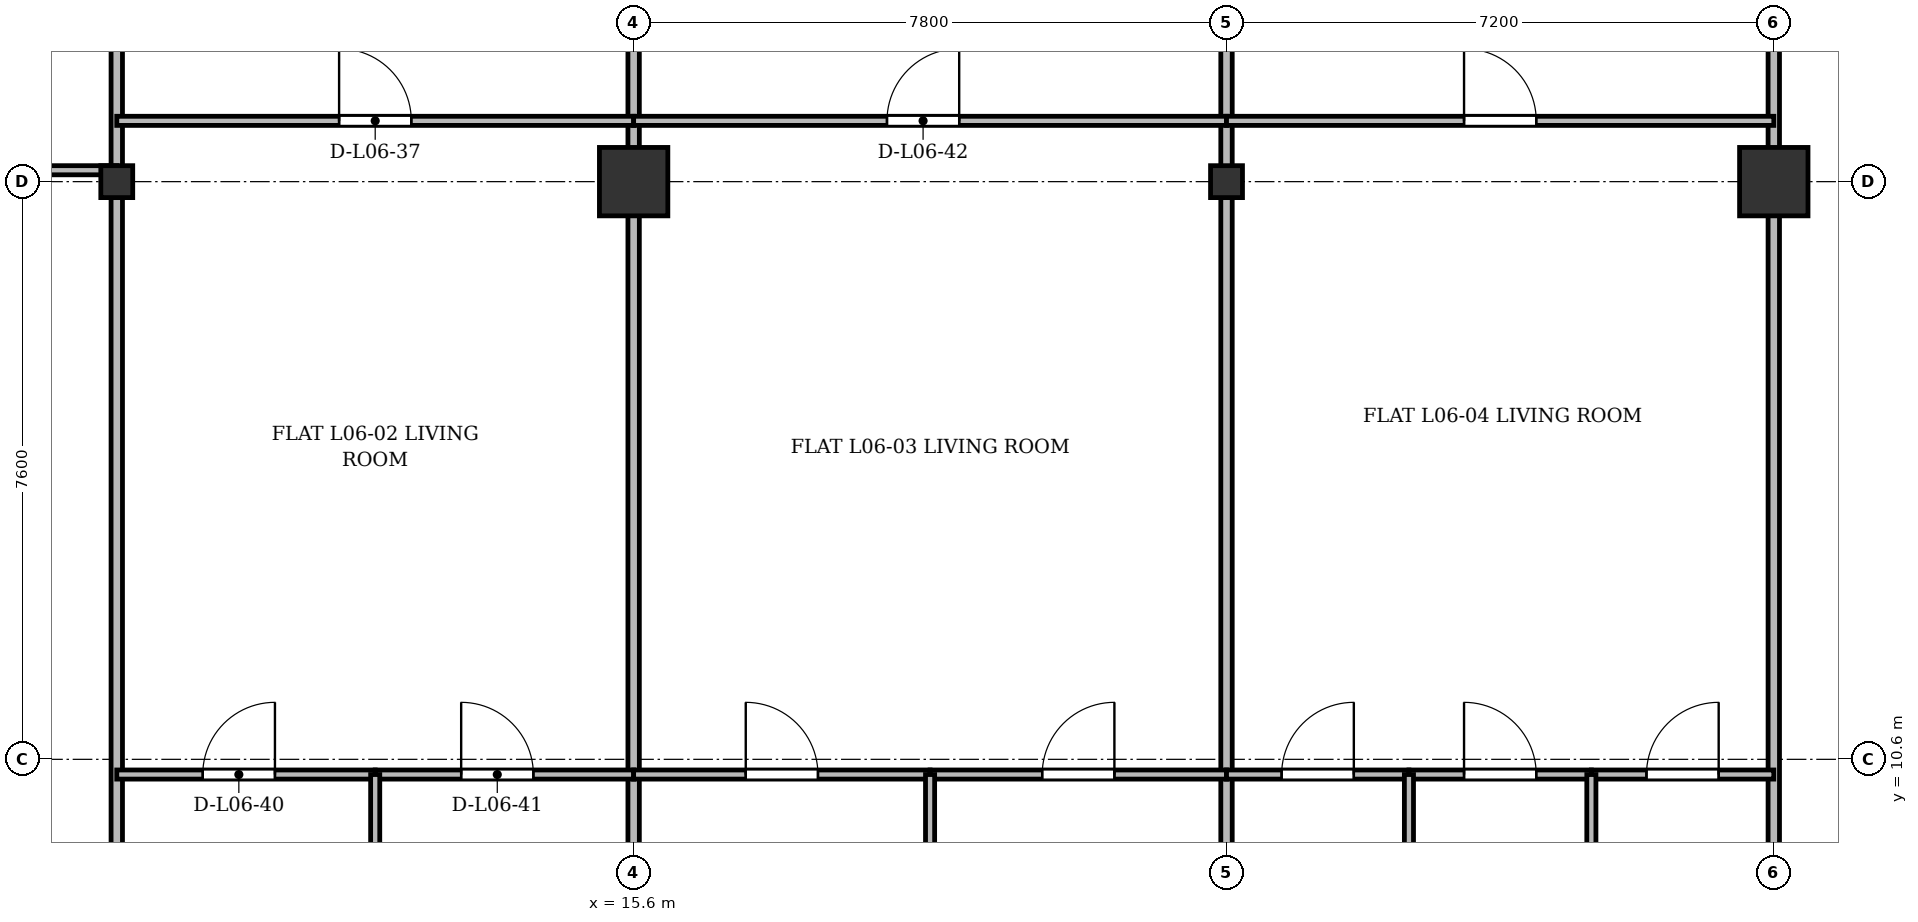
"""IFC4 building model, lengths in metres.
Left out: names, types, materials, properties, quantities, classifications, styles, units other than length and angle.
Written with IfcOpenShell. Run it as: python <this file> out.ifc"""

import sys

from ifc_helpers import new_model, si_unit, direction, frame, frame_2d, origin, origin_2d, place, context, subcontext, project, spatial, rectangle, i_section, extrude, source, transform, mapped, element, fill, save


model = new_model("IFC4")
c1 = context("Model", 3, precision=1e-05, world=origin(), true_north=direction((0.0, 1.0)))
c2 = subcontext(c1, "Body", "Model", "MODEL_VIEW")
j1 = project(units=[si_unit("LENGTHUNIT", "METRE"), si_unit("PLANEANGLEUNIT", "RADIAN")], contexts=[c1])
p1 = place(None, origin())
s1 = spatial("IfcSite", under=j1, at=p1, CompositionType="ELEMENT")
p2 = place(p1, origin())
s2 = spatial("IfcBuilding", under=s1, at=p2, CompositionType="ELEMENT")
p3 = place(p2, frame((0.0, 0.0, 27.1)))
s3 = spatial("IfcBuildingStorey", under=s2, at=p3, CompositionType="ELEMENT", Elevation=27.1)
m1 = source(origin(), c2, "Body", "SweptSolid", [
    extrude(i_section(OverallWidth=0.42, OverallDepth=0.42, WebThickness=0.026, FlangeThickness=0.04, at=origin_2d()), origin(), (0.0, 0.0, 1.0), 3.6),
])
p4 = place(p3, frame((8.8, 18.2, 0.0), z_axis=(0.0, 0.0, 1.0), x_axis=(1.0, 0.0, 0.0)))
e1 = element("IfcColumn", 1, at=p4, inside=s3, PredefinedType="COLUMN", context=c2, shape_type="MappedRepresentation", body=[
    mapped(m1, transform((0.0, 0.0, 0.0), x_axis=(1.0, 0.0, 0.0), y_axis=(0.0, 1.0, 0.0), z_axis=(0.0, 0.0, 1.0), scale=1.0)),
])
m2 = source(origin(), c2, "Body", "SweptSolid", [
    extrude(rectangle(XDim=0.9, YDim=0.9, at=origin_2d()), origin(), (0.0, 0.0, 1.0), 3.6),
])
p5 = place(p3, frame((15.6, 18.2, 0.0), z_axis=(0.0, 0.0, 1.0), x_axis=(1.0, 0.0, 0.0)))
e2 = element("IfcColumn", 2, at=p5, inside=s3, PredefinedType="COLUMN", context=c2, shape_type="MappedRepresentation", body=[
    mapped(m2, transform((0.0, 0.0, 0.0), x_axis=(1.0, 0.0, 0.0), y_axis=(0.0, 1.0, 0.0), z_axis=(0.0, 0.0, 1.0), scale=1.0)),
])
p6 = place(p3, frame((23.4, 18.2, 0.0), z_axis=(0.0, 0.0, 1.0), x_axis=(1.0, 0.0, 0.0)))
e3 = element("IfcColumn", 3, at=p6, inside=s3, PredefinedType="COLUMN", context=c2, shape_type="MappedRepresentation", body=[
    mapped(m1, transform((0.0, 0.0, 0.0), x_axis=(1.0, 0.0, 0.0), y_axis=(0.0, 1.0, 0.0), z_axis=(0.0, 0.0, 1.0), scale=1.0)),
])
p7 = place(p3, frame((30.6, 18.2, 0.0), z_axis=(0.0, 0.0, 1.0), x_axis=(1.0, 0.0, 0.0)))
e4 = element("IfcColumn", 4, at=p7, inside=s3, PredefinedType="COLUMN", context=c2, shape_type="MappedRepresentation", body=[
    mapped(m2, transform((0.0, 0.0, 0.0), x_axis=(1.0, 0.0, 0.0), y_axis=(0.0, 1.0, 0.0), z_axis=(0.0, 0.0, 1.0), scale=1.0)),
])
for number, where, z_axis, x_axis in (
    (5, (8.8, 3.145, 0.0), (0.0, 0.0, 1.0), (0.0, 1.0, 0.0)),
    (6, (15.6, 3.145, 0.0), (0.0, 0.0, 1.0), (0.0, 1.0, 0.0)),
    (7, (23.4, 3.145, 0.0), (0.0, 0.0, 1.0), (0.0, 1.0, 0.0)),
    (8, (30.6, 3.145, 0.0), (0.0, 0.0, 1.0), (0.0, 1.0, 0.0)),
):
    element("IfcWall", number, at=place(p3, frame(where, z_axis=z_axis, x_axis=x_axis)), inside=s3, PredefinedType="PARTITIONING", context=c2, shape_type="SweptSolid", body=[
        extrude(rectangle(XDim=24.455, YDim=0.15, at=frame_2d((12.228, 0.0))), origin(), (0.0, 0.0, 1.0), 2.752),
    ])
p8 = place(p3, frame((4.76, 18.35, 0.0), z_axis=(0.0, 0.0, 1.0), x_axis=(1.0, 0.0, 0.0)))
e9 = element("IfcWall", 9, at=p8, inside=s3, PredefinedType="PARTITIONING", context=c2, shape_type="SweptSolid", body=[
    extrude(rectangle(XDim=4.04, YDim=0.12, at=frame_2d((2.02, 0.0))), origin(), (0.0, 0.0, 1.0), 2.69),
])
p9 = place(p8, frame((1.545, 0.0, 0.0)))
e10 = element("IfcOpeningElement", 10, at=p9, cuts=e9, PredefinedType="OPENING", context=c2, shape_type="SweptSolid", body=[
    extrude(rectangle(XDim=0.95, YDim=2.15, at=frame_2d((0.475, 1.075))), frame((0.0, 0.07, 0.0), z_axis=(0.0, -1.0, 0.0), x_axis=(1.0, 0.0, 0.0)), (0.0, 0.0, 1.0), 0.14),
])
p10 = place(p3, frame((8.8, 19.0, 0.0), z_axis=(0.0, 0.0, 1.0), x_axis=(1.0, 0.0, 0.0)))
e11 = element("IfcWall", 11, at=p10, inside=s3, PredefinedType="PARTITIONING", context=c2, shape_type="SweptSolid", body=[
    extrude(rectangle(XDim=6.8, YDim=0.12, at=frame_2d((3.4, 0.0))), origin(), (0.0, 0.0, 1.0), 2.752),
])
p11 = place(p10, frame((2.925, 0.0, 0.0)))
e12 = element("IfcOpeningElement", 12, at=p11, cuts=e11, PredefinedType="OPENING", context=c2, shape_type="SweptSolid", body=[
    extrude(rectangle(XDim=0.95, YDim=2.15, at=frame_2d((0.475, 1.075))), frame((0.0, 0.07, 0.0), z_axis=(0.0, -1.0, 0.0), x_axis=(1.0, 0.0, 0.0)), (0.0, 0.0, 1.0), 0.14),
])
p12 = place(p3, frame((8.8, 10.4, 0.0), z_axis=(0.0, 0.0, 1.0), x_axis=(1.0, 0.0, 0.0)))
e13 = element("IfcWall", 13, at=p12, inside=s3, PredefinedType="PARTITIONING", context=c2, shape_type="SweptSolid", body=[
    extrude(rectangle(XDim=3.4, YDim=0.12, at=frame_2d((1.7, 0.0))), origin(), (0.0, 0.0, 1.0), 2.752),
])
p13 = place(p12, frame((1.131, 0.0, 0.0)))
e14 = element("IfcOpeningElement", 14, at=p13, cuts=e13, PredefinedType="OPENING", context=c2, shape_type="SweptSolid", body=[
    extrude(rectangle(XDim=0.95, YDim=2.15, at=frame_2d((0.475, 1.075))), frame((0.0, 0.07, 0.0), z_axis=(0.0, -1.0, 0.0), x_axis=(1.0, 0.0, 0.0)), (0.0, 0.0, 1.0), 0.14),
])
p14 = place(p3, frame((12.2, 10.4, 0.0), z_axis=(0.0, 0.0, 1.0), x_axis=(1.0, 0.0, 0.0)))
e15 = element("IfcWall", 15, at=p14, inside=s3, PredefinedType="PARTITIONING", context=c2, shape_type="SweptSolid", body=[
    extrude(rectangle(XDim=3.4, YDim=0.12, at=frame_2d((1.7, 0.0))), origin(), (0.0, 0.0, 1.0), 2.752),
])
p15 = place(p14, frame((1.131, 0.0, 0.0)))
e16 = element("IfcOpeningElement", 16, at=p15, cuts=e15, PredefinedType="OPENING", context=c2, shape_type="SweptSolid", body=[
    extrude(rectangle(XDim=0.95, YDim=2.15, at=frame_2d((0.475, 1.075))), frame((0.0, 0.07, 0.0), z_axis=(0.0, -1.0, 0.0), x_axis=(1.0, 0.0, 0.0)), (0.0, 0.0, 1.0), 0.14),
])
p16 = place(p3, frame((12.2, 3.145, 0.0), z_axis=(0.0, 0.0, 1.0), x_axis=(0.0, 1.0, 0.0)))
e17 = element("IfcWall", 17, at=p16, inside=s3, PredefinedType="PARTITIONING", context=c2, shape_type="SweptSolid", body=[
    extrude(rectangle(XDim=7.255, YDim=0.12, at=frame_2d((3.627, 0.0))), origin(), (0.0, 0.0, 1.0), 2.69),
])
p17 = place(p3, frame((15.6, 19.0, 0.0), z_axis=(0.0, 0.0, 1.0), x_axis=(1.0, 0.0, 0.0)))
e18 = element("IfcWall", 18, at=p17, inside=s3, PredefinedType="PARTITIONING", context=c2, shape_type="SweptSolid", body=[
    extrude(rectangle(XDim=7.8, YDim=0.12, at=frame_2d((3.9, 0.0))), origin(), (0.0, 0.0, 1.0), 2.752),
])
p18 = place(p17, frame((3.333, 0.0, 0.0)))
e19 = element("IfcOpeningElement", 19, at=p18, cuts=e18, PredefinedType="OPENING", context=c2, shape_type="SweptSolid", body=[
    extrude(rectangle(XDim=0.95, YDim=2.15, at=frame_2d((0.475, 1.075))), frame((0.0, 0.07, 0.0), z_axis=(0.0, -1.0, 0.0), x_axis=(1.0, 0.0, 0.0)), (0.0, 0.0, 1.0), 0.14),
])
p19 = place(p3, frame((15.6, 10.4, 0.0), z_axis=(0.0, 0.0, 1.0), x_axis=(1.0, 0.0, 0.0)))
e20 = element("IfcWall", 20, at=p19, inside=s3, PredefinedType="PARTITIONING", context=c2, shape_type="SweptSolid", body=[
    extrude(rectangle(XDim=3.9, YDim=0.12, at=frame_2d((1.95, 0.0))), origin(), (0.0, 0.0, 1.0), 2.752),
])
p20 = place(p19, frame((1.475, 0.0, 0.0)))
e21 = element("IfcOpeningElement", 21, at=p20, cuts=e20, PredefinedType="OPENING", context=c2, shape_type="SweptSolid", body=[
    extrude(rectangle(XDim=0.95, YDim=2.15, at=frame_2d((0.475, 1.075))), frame((0.0, 0.07, 0.0), z_axis=(0.0, -1.0, 0.0), x_axis=(1.0, 0.0, 0.0)), (0.0, 0.0, 1.0), 0.14),
])
p21 = place(p3, frame((19.5, 10.4, 0.0), z_axis=(0.0, 0.0, 1.0), x_axis=(1.0, 0.0, 0.0)))
e22 = element("IfcWall", 22, at=p21, inside=s3, PredefinedType="PARTITIONING", context=c2, shape_type="SweptSolid", body=[
    extrude(rectangle(XDim=3.9, YDim=0.12, at=frame_2d((1.95, 0.0))), origin(), (0.0, 0.0, 1.0), 2.752),
])
p22 = place(p21, frame((1.475, 0.0, 0.0)))
e23 = element("IfcOpeningElement", 23, at=p22, cuts=e22, PredefinedType="OPENING", context=c2, shape_type="SweptSolid", body=[
    extrude(rectangle(XDim=0.95, YDim=2.15, at=frame_2d((0.475, 1.075))), frame((0.0, 0.07, 0.0), z_axis=(0.0, -1.0, 0.0), x_axis=(1.0, 0.0, 0.0)), (0.0, 0.0, 1.0), 0.14),
])
p23 = place(p3, frame((19.5, 3.145, 0.0), z_axis=(0.0, 0.0, 1.0), x_axis=(0.0, 1.0, 0.0)))
e24 = element("IfcWall", 24, at=p23, inside=s3, PredefinedType="PARTITIONING", context=c2, shape_type="SweptSolid", body=[
    extrude(rectangle(XDim=7.255, YDim=0.12, at=frame_2d((3.627, 0.0))), origin(), (0.0, 0.0, 1.0), 2.69),
])
p24 = place(p3, frame((23.4, 19.0, 0.0), z_axis=(0.0, 0.0, 1.0), x_axis=(1.0, 0.0, 0.0)))
e25 = element("IfcWall", 25, at=p24, inside=s3, PredefinedType="PARTITIONING", context=c2, shape_type="SweptSolid", body=[
    extrude(rectangle(XDim=7.2, YDim=0.12, at=frame_2d((3.6, 0.0))), origin(), (0.0, 0.0, 1.0), 2.752),
])
p25 = place(p24, frame((3.125, 0.0, 0.0)))
e26 = element("IfcOpeningElement", 26, at=p25, cuts=e25, PredefinedType="OPENING", context=c2, shape_type="SweptSolid", body=[
    extrude(rectangle(XDim=0.95, YDim=2.15, at=frame_2d((0.475, 1.075))), frame((0.0, 0.07, 0.0), z_axis=(0.0, -1.0, 0.0), x_axis=(1.0, 0.0, 0.0)), (0.0, 0.0, 1.0), 0.14),
])
p26 = place(p3, frame((23.4, 10.4, 0.0), z_axis=(0.0, 0.0, 1.0), x_axis=(1.0, 0.0, 0.0)))
e27 = element("IfcWall", 27, at=p26, inside=s3, PredefinedType="PARTITIONING", context=c2, shape_type="SweptSolid", body=[
    extrude(rectangle(XDim=2.4, YDim=0.12, at=frame_2d((1.2, 0.0))), origin(), (0.0, 0.0, 1.0), 2.752),
])
p27 = place(p26, frame((0.725, 0.0, 0.0)))
e28 = element("IfcOpeningElement", 28, at=p27, cuts=e27, PredefinedType="OPENING", context=c2, shape_type="SweptSolid", body=[
    extrude(rectangle(XDim=0.95, YDim=2.15, at=frame_2d((0.475, 1.075))), frame((0.0, 0.07, 0.0), z_axis=(0.0, -1.0, 0.0), x_axis=(1.0, 0.0, 0.0)), (0.0, 0.0, 1.0), 0.14),
])
p28 = place(p3, frame((25.8, 10.4, 0.0), z_axis=(0.0, 0.0, 1.0), x_axis=(1.0, 0.0, 0.0)))
e29 = element("IfcWall", 29, at=p28, inside=s3, PredefinedType="PARTITIONING", context=c2, shape_type="SweptSolid", body=[
    extrude(rectangle(XDim=2.4, YDim=0.12, at=frame_2d((1.2, 0.0))), origin(), (0.0, 0.0, 1.0), 3.34),
])
p29 = place(p28, frame((0.725, 0.0, 0.0)))
e30 = element("IfcOpeningElement", 30, at=p29, cuts=e29, PredefinedType="OPENING", context=c2, shape_type="SweptSolid", body=[
    extrude(rectangle(XDim=0.95, YDim=2.15, at=frame_2d((0.475, 1.075))), frame((0.0, 0.07, 0.0), z_axis=(0.0, -1.0, 0.0), x_axis=(1.0, 0.0, 0.0)), (0.0, 0.0, 1.0), 0.14),
])
p30 = place(p3, frame((25.8, 3.145, 0.0), z_axis=(0.0, 0.0, 1.0), x_axis=(0.0, 1.0, 0.0)))
e31 = element("IfcWall", 31, at=p30, inside=s3, PredefinedType="PARTITIONING", context=c2, shape_type="SweptSolid", body=[
    extrude(rectangle(XDim=7.255, YDim=0.12, at=frame_2d((3.627, 0.0))), origin(), (0.0, 0.0, 1.0), 2.69),
])
p31 = place(p3, frame((28.2, 10.4, 0.0), z_axis=(0.0, 0.0, 1.0), x_axis=(1.0, 0.0, 0.0)))
e32 = element("IfcWall", 32, at=p31, inside=s3, PredefinedType="PARTITIONING", context=c2, shape_type="SweptSolid", body=[
    extrude(rectangle(XDim=2.4, YDim=0.12, at=frame_2d((1.2, 0.0))), origin(), (0.0, 0.0, 1.0), 2.752),
])
p32 = place(p31, frame((0.725, 0.0, 0.0)))
e33 = element("IfcOpeningElement", 33, at=p32, cuts=e32, PredefinedType="OPENING", context=c2, shape_type="SweptSolid", body=[
    extrude(rectangle(XDim=0.95, YDim=2.15, at=frame_2d((0.475, 1.075))), frame((0.0, 0.07, 0.0), z_axis=(0.0, -1.0, 0.0), x_axis=(1.0, 0.0, 0.0)), (0.0, 0.0, 1.0), 0.14),
])
p33 = place(p3, frame((28.2, 3.145, 0.0), z_axis=(0.0, 0.0, 1.0), x_axis=(0.0, 1.0, 0.0)))
e34 = element("IfcWall", 34, at=p33, inside=s3, PredefinedType="PARTITIONING", context=c2, shape_type="SweptSolid", body=[
    extrude(rectangle(XDim=7.255, YDim=0.12, at=frame_2d((3.627, 0.0))), origin(), (0.0, 0.0, 1.0), 2.69),
])
m3 = source(origin(), c2, "Body", "SweptSolid", [
    extrude(rectangle(XDim=0.95, YDim=2.15, at=frame_2d((0.475, 1.075))), frame((0.0, 0.025, 0.0), z_axis=(0.0, -1.0, 0.0), x_axis=(1.0, 0.0, 0.0)), (0.0, 0.0, 1.0), 0.05),
])
p34 = place(p11, origin())
e35 = element("IfcDoor", 35, at=p34, inside=s3, OperationType="SINGLE_SWING_LEFT", PredefinedType="DOOR", context=c2, shape_type="MappedRepresentation", body=[
    mapped(m3, transform((0.0, 0.0, 0.0), x_axis=(1.0, 0.0, 0.0), y_axis=(0.0, 1.0, 0.0), z_axis=(0.0, 0.0, 1.0), scale=1.0)),
])
fill(e12, e35)
p35 = place(p13, origin())
e36 = element("IfcDoor", 36, at=p35, inside=s3, OperationType="SINGLE_SWING_RIGHT", PredefinedType="DOOR", context=c2, shape_type="MappedRepresentation", body=[
    mapped(m3, transform((0.0, 0.0, 0.0), x_axis=(1.0, 0.0, 0.0), y_axis=(0.0, 1.0, 0.0), z_axis=(0.0, 0.0, 1.0), scale=1.0)),
])
fill(e14, e36)
p36 = place(p15, origin())
e37 = element("IfcDoor", 37, at=p36, inside=s3, OperationType="SINGLE_SWING_LEFT", PredefinedType="DOOR", context=c2, shape_type="MappedRepresentation", body=[
    mapped(m3, transform((0.0, 0.0, 0.0), x_axis=(1.0, 0.0, 0.0), y_axis=(0.0, 1.0, 0.0), z_axis=(0.0, 0.0, 1.0), scale=1.0)),
])
fill(e16, e37)
p37 = place(p18, origin())
e38 = element("IfcDoor", 38, at=p37, inside=s3, OperationType="SINGLE_SWING_RIGHT", PredefinedType="DOOR", context=c2, shape_type="MappedRepresentation", body=[
    mapped(m3, transform((0.0, 0.0, 0.0), x_axis=(1.0, 0.0, 0.0), y_axis=(0.0, 1.0, 0.0), z_axis=(0.0, 0.0, 1.0), scale=1.0)),
])
fill(e19, e38)
p38 = place(p20, origin())
e39 = element("IfcDoor", 39, at=p38, inside=s3, OperationType="SINGLE_SWING_LEFT", PredefinedType="DOOR", context=c2, shape_type="MappedRepresentation", body=[
    mapped(m3, transform((0.0, 0.0, 0.0), x_axis=(1.0, 0.0, 0.0), y_axis=(0.0, 1.0, 0.0), z_axis=(0.0, 0.0, 1.0), scale=1.0)),
])
fill(e21, e39)
p39 = place(p22, origin())
e40 = element("IfcDoor", 40, at=p39, inside=s3, OperationType="SINGLE_SWING_RIGHT", PredefinedType="DOOR", context=c2, shape_type="MappedRepresentation", body=[
    mapped(m3, transform((0.0, 0.0, 0.0), x_axis=(1.0, 0.0, 0.0), y_axis=(0.0, 1.0, 0.0), z_axis=(0.0, 0.0, 1.0), scale=1.0)),
])
fill(e23, e40)
p40 = place(p25, origin())
e41 = element("IfcDoor", 41, at=p40, inside=s3, OperationType="SINGLE_SWING_LEFT", PredefinedType="DOOR", context=c2, shape_type="MappedRepresentation", body=[
    mapped(m3, transform((0.0, 0.0, 0.0), x_axis=(1.0, 0.0, 0.0), y_axis=(0.0, 1.0, 0.0), z_axis=(0.0, 0.0, 1.0), scale=1.0)),
])
fill(e26, e41)
p41 = place(p27, origin())
e42 = element("IfcDoor", 42, at=p41, inside=s3, OperationType="SINGLE_SWING_RIGHT", PredefinedType="DOOR", context=c2, shape_type="MappedRepresentation", body=[
    mapped(m3, transform((0.0, 0.0, 0.0), x_axis=(1.0, 0.0, 0.0), y_axis=(0.0, 1.0, 0.0), z_axis=(0.0, 0.0, 1.0), scale=1.0)),
])
fill(e28, e42)
p42 = place(p29, origin())
e43 = element("IfcDoor", 43, at=p42, inside=s3, OperationType="SINGLE_SWING_LEFT", PredefinedType="DOOR", context=c2, shape_type="MappedRepresentation", body=[
    mapped(m3, transform((0.0, 0.0, 0.0), x_axis=(1.0, 0.0, 0.0), y_axis=(0.0, 1.0, 0.0), z_axis=(0.0, 0.0, 1.0), scale=1.0)),
])
fill(e30, e43)
p43 = place(p32, origin())
e44 = element("IfcDoor", 44, at=p43, inside=s3, OperationType="SINGLE_SWING_RIGHT", PredefinedType="DOOR", context=c2, shape_type="MappedRepresentation", body=[
    mapped(m3, transform((0.0, 0.0, 0.0), x_axis=(1.0, 0.0, 0.0), y_axis=(0.0, 1.0, 0.0), z_axis=(0.0, 0.0, 1.0), scale=1.0)),
])
fill(e33, e44)
save(model, sys.argv[1])
